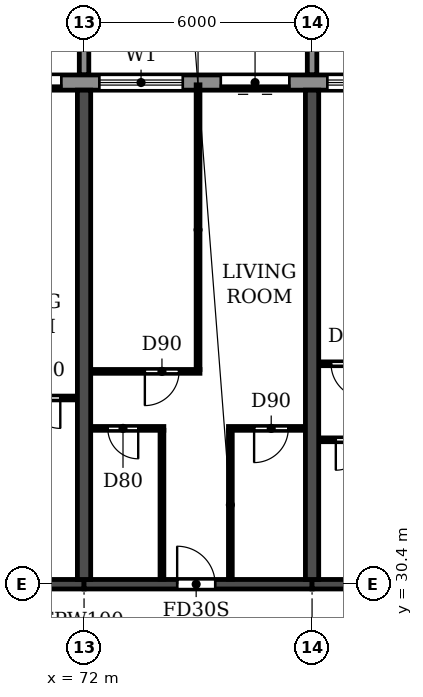
"""IFC4 building model, lengths in metres.
Left out: names, types, materials, properties, quantities, classifications, styles, units other than length and angle.
Written with IfcOpenShell. Run it as: python <this file> out.ifc"""

import sys

from ifc_helpers import new_model, si_unit, direction, frame, frame_2d, origin, place, context, subcontext, project, spatial, polyline, rectangle, outline, extrude, source, transform, mapped, element, fill, save


model = new_model("IFC4")
c1 = context("Model", 3, precision=1e-05, world=origin(), true_north=direction((0.0, 1.0)))
c2 = subcontext(c1, "Body", "Model", "MODEL_VIEW")
j1 = project(units=[si_unit("LENGTHUNIT", "METRE"), si_unit("PLANEANGLEUNIT", "RADIAN")], contexts=[c1])
p1 = place(None, origin())
s1 = spatial("IfcSite", under=j1, at=p1, CompositionType="ELEMENT")
p2 = place(p1, origin())
s2 = spatial("IfcBuilding", under=s1, at=p2, CompositionType="ELEMENT")
p3 = place(p2, frame((0.0, 0.0, 92.7)))
s3 = spatial("IfcBuildingStorey", under=s2, at=p3, CompositionType="ELEMENT", Elevation=92.7)
for number, where, z_axis, x_axis in (
    (1, (72.0, 30.525, 0.0), (0.0, 0.0, 1.0), (0.0, 1.0, 0.0)),
    (2, (78.0, 30.525, 0.0), (0.0, 0.0, 1.0), (0.0, 1.0, 0.0)),
):
    element("IfcWall", number, at=place(p3, frame(where, z_axis=z_axis, x_axis=x_axis)), inside=s3, PredefinedType="SHEAR", context=c2, shape_type="SweptSolid", body=[
        extrude(rectangle(XDim=12.875, YDim=0.35, at=frame_2d((6.438, 0.0))), origin(), (0.0, 0.0, 1.0), 3.06),
    ])
p4 = place(p3, frame((66.0, 30.4, 0.0), z_axis=(0.0, 0.0, 1.0), x_axis=(1.0, 0.0, 0.0)))
e3 = element("IfcWall", 3, at=p4, inside=s3, PredefinedType="SHEAR", context=c2, shape_type="SweptSolid", body=[
    extrude(rectangle(XDim=6.0, YDim=0.25, at=frame_2d((3.0, 0.0))), origin(), (0.0, 0.0, 1.0), 2.46),
])
p5 = place(p4, frame((2.55, 0.0, 0.0)))
e4 = element("IfcOpeningElement", 4, at=p5, cuts=e3, PredefinedType="OPENING", context=c2, shape_type="SweptSolid", body=[
    extrude(rectangle(XDim=1.0, YDim=2.1, at=frame_2d((0.5, 1.05))), frame((0.0, 0.135, 0.0), z_axis=(0.0, -1.0, 0.0), x_axis=(1.0, 0.0, 0.0)), (0.0, 0.0, 1.0), 0.27),
])
p6 = place(p3, frame((72.0, 30.4, 0.0), z_axis=(0.0, 0.0, 1.0), x_axis=(1.0, 0.0, 0.0)))
e5 = element("IfcWall", 5, at=p6, inside=s3, PredefinedType="SHEAR", context=c2, shape_type="SweptSolid", body=[
    extrude(rectangle(XDim=6.0, YDim=0.25, at=frame_2d((3.0, 0.0))), origin(), (0.0, 0.0, 1.0), 2.46),
])
p7 = place(p6, frame((2.45, 0.0, 0.0)))
e6 = element("IfcOpeningElement", 6, at=p7, cuts=e5, PredefinedType="OPENING", context=c2, shape_type="SweptSolid", body=[
    extrude(rectangle(XDim=1.0, YDim=2.1, at=frame_2d((0.5, 1.05))), frame((0.0, 0.135, 0.0), z_axis=(0.0, -1.0, 0.0), x_axis=(1.0, 0.0, 0.0)), (0.0, 0.0, 1.0), 0.27),
])
p8 = place(p3, frame((78.0, 30.4, 0.0), z_axis=(0.0, 0.0, 1.0), x_axis=(1.0, 0.0, 0.0)))
e7 = element("IfcWall", 7, at=p8, inside=s3, PredefinedType="SHEAR", context=c2, shape_type="SweptSolid", body=[
    extrude(rectangle(XDim=6.0, YDim=0.25, at=frame_2d((3.0, 0.0))), origin(), (0.0, 0.0, 1.0), 2.46),
])
p9 = place(p8, frame((2.45, 0.0, 0.0)))
e8 = element("IfcOpeningElement", 8, at=p9, cuts=e7, PredefinedType="OPENING", context=c2, shape_type="SweptSolid", body=[
    extrude(rectangle(XDim=1.0, YDim=2.1, at=frame_2d((0.5, 1.05))), frame((0.0, 0.135, 0.0), z_axis=(0.0, -1.0, 0.0), x_axis=(1.0, 0.0, 0.0)), (0.0, 0.0, 1.0), 0.27),
])
p10 = place(p3, frame((91.317, 43.6, 0.0), z_axis=(0.0, 0.0, 1.0), x_axis=(-1.0, 0.0, 0.0)))
e9 = element("IfcWall", 9, at=p10, inside=s3, PredefinedType="STANDARD", context=c2, shape_type="SweptSolid", body=[
    extrude(rectangle(XDim=80.634, YDim=0.4, at=frame_2d((40.317, 0.0))), origin(), (0.0, 0.0, 1.0), 3.06),
])
p11 = place(p10, frame((76.717, 0.0, 0.9)))
e10 = element("IfcOpeningElement", 10, at=p11, cuts=e9, PredefinedType="OPENING", context=c2, shape_type="SweptSolid", body=[
    extrude(rectangle(XDim=2.2, YDim=1.5, at=frame_2d((1.1, 0.75))), frame((0.0, 0.21, 0.0), z_axis=(0.0, -1.0, 0.0), x_axis=(1.0, 0.0, 0.0)), (0.0, 0.0, 1.0), 0.42),
])
p12 = place(p10, frame((73.917, 0.0, 0.0)))
e11 = element("IfcOpeningElement", 11, at=p12, cuts=e9, PredefinedType="OPENING", context=c2, shape_type="SweptSolid", body=[
    extrude(rectangle(XDim=1.8, YDim=2.4, at=frame_2d((0.9, 1.2))), frame((0.0, 0.21, 0.0), z_axis=(0.0, -1.0, 0.0), x_axis=(1.0, 0.0, 0.0)), (0.0, 0.0, 1.0), 0.42),
])
p13 = place(p10, frame((70.717, 0.0, 0.9)))
e12 = element("IfcOpeningElement", 12, at=p13, cuts=e9, PredefinedType="OPENING", context=c2, shape_type="SweptSolid", body=[
    extrude(rectangle(XDim=2.2, YDim=1.5, at=frame_2d((1.1, 0.75))), frame((0.0, 0.21, 0.0), z_axis=(0.0, -1.0, 0.0), x_axis=(1.0, 0.0, 0.0)), (0.0, 0.0, 1.0), 0.42),
])
p14 = place(p10, frame((67.717, 0.0, 0.9)))
e13 = element("IfcOpeningElement", 13, at=p14, cuts=e9, PredefinedType="OPENING", context=c2, shape_type="SweptSolid", body=[
    extrude(rectangle(XDim=2.2, YDim=1.5, at=frame_2d((1.1, 0.75))), frame((0.0, 0.21, 0.0), z_axis=(0.0, -1.0, 0.0), x_axis=(1.0, 0.0, 0.0)), (0.0, 0.0, 1.0), 0.42),
])
p15 = place(p10, frame((64.717, 0.0, 0.9)))
e14 = element("IfcOpeningElement", 14, at=p15, cuts=e9, PredefinedType="OPENING", context=c2, shape_type="SweptSolid", body=[
    extrude(rectangle(XDim=2.2, YDim=1.5, at=frame_2d((1.1, 0.75))), frame((0.0, 0.21, 0.0), z_axis=(0.0, -1.0, 0.0), x_axis=(1.0, 0.0, 0.0)), (0.0, 0.0, 1.0), 0.42),
])
p16 = place(p10, frame((61.917, 0.0, 0.0)))
e15 = element("IfcOpeningElement", 15, at=p16, cuts=e9, PredefinedType="OPENING", context=c2, shape_type="SweptSolid", body=[
    extrude(rectangle(XDim=1.8, YDim=2.4, at=frame_2d((0.9, 1.2))), frame((0.0, 0.21, 0.0), z_axis=(0.0, -1.0, 0.0), x_axis=(1.0, 0.0, 0.0)), (0.0, 0.0, 1.0), 0.42),
])
p17 = place(p10, frame((58.717, 0.0, 0.9)))
e16 = element("IfcOpeningElement", 16, at=p17, cuts=e9, PredefinedType="OPENING", context=c2, shape_type="SweptSolid", body=[
    extrude(rectangle(XDim=2.2, YDim=1.5, at=frame_2d((1.1, 0.75))), frame((0.0, 0.21, 0.0), z_axis=(0.0, -1.0, 0.0), x_axis=(1.0, 0.0, 0.0)), (0.0, 0.0, 1.0), 0.42),
])
p18 = place(p10, frame((55.717, 0.0, 0.9)))
e17 = element("IfcOpeningElement", 17, at=p18, cuts=e9, PredefinedType="OPENING", context=c2, shape_type="SweptSolid", body=[
    extrude(rectangle(XDim=2.2, YDim=1.5, at=frame_2d((1.1, 0.75))), frame((0.0, 0.21, 0.0), z_axis=(0.0, -1.0, 0.0), x_axis=(1.0, 0.0, 0.0)), (0.0, 0.0, 1.0), 0.42),
])
p19 = place(p10, frame((52.917, 0.0, 0.0)))
e18 = element("IfcOpeningElement", 18, at=p19, cuts=e9, PredefinedType="OPENING", context=c2, shape_type="SweptSolid", body=[
    extrude(rectangle(XDim=1.8, YDim=2.4, at=frame_2d((0.9, 1.2))), frame((0.0, 0.21, 0.0), z_axis=(0.0, -1.0, 0.0), x_axis=(1.0, 0.0, 0.0)), (0.0, 0.0, 1.0), 0.42),
])
p20 = place(p10, frame((49.717, 0.0, 0.9)))
e19 = element("IfcOpeningElement", 19, at=p20, cuts=e9, PredefinedType="OPENING", context=c2, shape_type="SweptSolid", body=[
    extrude(rectangle(XDim=2.2, YDim=1.5, at=frame_2d((1.1, 0.75))), frame((0.0, 0.21, 0.0), z_axis=(0.0, -1.0, 0.0), x_axis=(1.0, 0.0, 0.0)), (0.0, 0.0, 1.0), 0.42),
])
p21 = place(p10, frame((46.717, 0.0, 0.9)))
e20 = element("IfcOpeningElement", 20, at=p21, cuts=e9, PredefinedType="OPENING", context=c2, shape_type="SweptSolid", body=[
    extrude(rectangle(XDim=2.2, YDim=1.5, at=frame_2d((1.1, 0.75))), frame((0.0, 0.21, 0.0), z_axis=(0.0, -1.0, 0.0), x_axis=(1.0, 0.0, 0.0)), (0.0, 0.0, 1.0), 0.42),
])
p22 = place(p10, frame((43.717, 0.0, 0.9)))
e21 = element("IfcOpeningElement", 21, at=p22, cuts=e9, PredefinedType="OPENING", context=c2, shape_type="SweptSolid", body=[
    extrude(rectangle(XDim=2.2, YDim=1.5, at=frame_2d((1.1, 0.75))), frame((0.0, 0.21, 0.0), z_axis=(0.0, -1.0, 0.0), x_axis=(1.0, 0.0, 0.0)), (0.0, 0.0, 1.0), 0.42),
])
p23 = place(p10, frame((40.717, 0.0, 0.9)))
e22 = element("IfcOpeningElement", 22, at=p23, cuts=e9, PredefinedType="OPENING", context=c2, shape_type="SweptSolid", body=[
    extrude(rectangle(XDim=2.2, YDim=1.5, at=frame_2d((1.1, 0.75))), frame((0.0, 0.21, 0.0), z_axis=(0.0, -1.0, 0.0), x_axis=(1.0, 0.0, 0.0)), (0.0, 0.0, 1.0), 0.42),
])
p24 = place(p10, frame((37.917, 0.0, 0.0)))
e23 = element("IfcOpeningElement", 23, at=p24, cuts=e9, PredefinedType="OPENING", context=c2, shape_type="SweptSolid", body=[
    extrude(rectangle(XDim=1.8, YDim=2.4, at=frame_2d((0.9, 1.2))), frame((0.0, 0.21, 0.0), z_axis=(0.0, -1.0, 0.0), x_axis=(1.0, 0.0, 0.0)), (0.0, 0.0, 1.0), 0.42),
])
p25 = place(p10, frame((34.917, 0.0, 0.0)))
e24 = element("IfcOpeningElement", 24, at=p25, cuts=e9, PredefinedType="OPENING", context=c2, shape_type="SweptSolid", body=[
    extrude(rectangle(XDim=1.8, YDim=2.4, at=frame_2d((0.9, 1.2))), frame((0.0, 0.21, 0.0), z_axis=(0.0, -1.0, 0.0), x_axis=(1.0, 0.0, 0.0)), (0.0, 0.0, 1.0), 0.42),
])
p26 = place(p10, frame((31.717, 0.0, 0.9)))
e25 = element("IfcOpeningElement", 25, at=p26, cuts=e9, PredefinedType="OPENING", context=c2, shape_type="SweptSolid", body=[
    extrude(rectangle(XDim=2.2, YDim=1.5, at=frame_2d((1.1, 0.75))), frame((0.0, 0.21, 0.0), z_axis=(0.0, -1.0, 0.0), x_axis=(1.0, 0.0, 0.0)), (0.0, 0.0, 1.0), 0.42),
])
p27 = place(p10, frame((28.717, 0.0, 0.9)))
e26 = element("IfcOpeningElement", 26, at=p27, cuts=e9, PredefinedType="OPENING", context=c2, shape_type="SweptSolid", body=[
    extrude(rectangle(XDim=2.2, YDim=1.5, at=frame_2d((1.1, 0.75))), frame((0.0, 0.21, 0.0), z_axis=(0.0, -1.0, 0.0), x_axis=(1.0, 0.0, 0.0)), (0.0, 0.0, 1.0), 0.42),
])
p28 = place(p10, frame((25.717, 0.0, 0.9)))
e27 = element("IfcOpeningElement", 27, at=p28, cuts=e9, PredefinedType="OPENING", context=c2, shape_type="SweptSolid", body=[
    extrude(rectangle(XDim=2.2, YDim=1.5, at=frame_2d((1.1, 0.75))), frame((0.0, 0.21, 0.0), z_axis=(0.0, -1.0, 0.0), x_axis=(1.0, 0.0, 0.0)), (0.0, 0.0, 1.0), 0.42),
])
p29 = place(p10, frame((22.717, 0.0, 0.9)))
e28 = element("IfcOpeningElement", 28, at=p29, cuts=e9, PredefinedType="OPENING", context=c2, shape_type="SweptSolid", body=[
    extrude(rectangle(XDim=2.2, YDim=1.5, at=frame_2d((1.1, 0.75))), frame((0.0, 0.21, 0.0), z_axis=(0.0, -1.0, 0.0), x_axis=(1.0, 0.0, 0.0)), (0.0, 0.0, 1.0), 0.42),
])
p30 = place(p10, frame((19.917, 0.0, 0.0)))
e29 = element("IfcOpeningElement", 29, at=p30, cuts=e9, PredefinedType="OPENING", context=c2, shape_type="SweptSolid", body=[
    extrude(rectangle(XDim=1.8, YDim=2.4, at=frame_2d((0.9, 1.2))), frame((0.0, 0.21, 0.0), z_axis=(0.0, -1.0, 0.0), x_axis=(1.0, 0.0, 0.0)), (0.0, 0.0, 1.0), 0.42),
])
p31 = place(p10, frame((16.717, 0.0, 0.9)))
e30 = element("IfcOpeningElement", 30, at=p31, cuts=e9, PredefinedType="OPENING", context=c2, shape_type="SweptSolid", body=[
    extrude(rectangle(XDim=2.2, YDim=1.5, at=frame_2d((1.1, 0.75))), frame((0.0, 0.21, 0.0), z_axis=(0.0, -1.0, 0.0), x_axis=(1.0, 0.0, 0.0)), (0.0, 0.0, 1.0), 0.42),
])
p32 = place(p10, frame((13.917, 0.0, 0.0)))
e31 = element("IfcOpeningElement", 31, at=p32, cuts=e9, PredefinedType="OPENING", context=c2, shape_type="SweptSolid", body=[
    extrude(rectangle(XDim=1.8, YDim=2.4, at=frame_2d((0.9, 1.2))), frame((0.0, 0.21, 0.0), z_axis=(0.0, -1.0, 0.0), x_axis=(1.0, 0.0, 0.0)), (0.0, 0.0, 1.0), 0.42),
])
p33 = place(p10, frame((10.717, 0.0, 0.9)))
e32 = element("IfcOpeningElement", 32, at=p33, cuts=e9, PredefinedType="OPENING", context=c2, shape_type="SweptSolid", body=[
    extrude(rectangle(XDim=2.2, YDim=1.5, at=frame_2d((1.1, 0.75))), frame((0.0, 0.21, 0.0), z_axis=(0.0, -1.0, 0.0), x_axis=(1.0, 0.0, 0.0)), (0.0, 0.0, 1.0), 0.42),
])
p34 = place(p10, frame((7.917, 0.0, 0.0)))
e33 = element("IfcOpeningElement", 33, at=p34, cuts=e9, PredefinedType="OPENING", context=c2, shape_type="SweptSolid", body=[
    extrude(rectangle(XDim=1.8, YDim=2.4, at=frame_2d((0.9, 1.2))), frame((0.0, 0.21, 0.0), z_axis=(0.0, -1.0, 0.0), x_axis=(1.0, 0.0, 0.0)), (0.0, 0.0, 1.0), 0.42),
])
p35 = place(p10, frame((4.717, 0.0, 0.9)))
e34 = element("IfcOpeningElement", 34, at=p35, cuts=e9, PredefinedType="OPENING", context=c2, shape_type="SweptSolid", body=[
    extrude(rectangle(XDim=2.2, YDim=1.5, at=frame_2d((1.1, 0.75))), frame((0.0, 0.21, 0.0), z_axis=(0.0, -1.0, 0.0), x_axis=(1.0, 0.0, 0.0)), (0.0, 0.0, 1.0), 0.42),
])
p36 = place(p10, frame((1.917, 0.0, 0.0)))
e35 = element("IfcOpeningElement", 35, at=p36, cuts=e9, PredefinedType="OPENING", context=c2, shape_type="SweptSolid", body=[
    extrude(rectangle(XDim=1.8, YDim=2.4, at=frame_2d((0.9, 1.2))), frame((0.0, 0.21, 0.0), z_axis=(0.0, -1.0, 0.0), x_axis=(1.0, 0.0, 0.0)), (0.0, 0.0, 1.0), 0.42),
])
m1 = source(origin(), c2, "Body", "SweptSolid", [
    extrude(outline(polyline([(0.0, 0.0), (0.25, 0.0), (0.25, 3.1), (0.0, 3.1), (0.0, 0.0)])), origin(), (0.0, 0.0, 1.0), 3.1),
])
for number, where in (
    (36, (71.875, 43.8, 0.0)),
    (37, (77.875, 43.8, 0.0)),
):
    element("IfcWall", number, at=place(p3, frame(where)), inside=s3, PredefinedType="STANDARD", context=c2, shape_type="MappedRepresentation", body=[
        mapped(m1, transform((0.0, 0.0, 0.0))),
    ])
p37 = place(p3, frame((78.185, 34.2, 0.0), z_axis=(0.0, 0.0, 1.0), x_axis=(1.0, 0.0, 0.0)))
e38 = element("IfcWall", 38, at=p37, inside=s3, PredefinedType="PARTITIONING", context=c2, shape_type="SweptSolid", body=[
    extrude(rectangle(XDim=1.915, YDim=0.1, at=frame_2d((0.958, 0.0))), origin(), (0.0, 0.0, 1.0), 3.06),
])
p38 = place(p37, frame((0.44, 0.0, 0.0)))
e39 = element("IfcOpeningElement", 39, at=p38, cuts=e38, PredefinedType="OPENING", context=c2, shape_type="SweptSolid", body=[
    extrude(rectangle(XDim=0.8, YDim=2.1, at=frame_2d((0.4, 1.05))), frame((0.0, 0.06, 0.0), z_axis=(0.0, -1.0, 0.0), x_axis=(1.0, 0.0, 0.0)), (0.0, 0.0, 1.0), 0.12),
])
p39 = place(p3, frame((72.185, 34.5, 0.0), z_axis=(0.0, 0.0, 1.0), x_axis=(1.0, 0.0, 0.0)))
e40 = element("IfcWall", 40, at=p39, inside=s3, PredefinedType="PARTITIONING", context=c2, shape_type="SweptSolid", body=[
    extrude(rectangle(XDim=1.915, YDim=0.1, at=frame_2d((0.958, 0.0))), origin(), (0.0, 0.0, 1.0), 3.06),
])
p40 = place(p39, frame((0.44, 0.0, 0.0)))
e41 = element("IfcOpeningElement", 41, at=p40, cuts=e40, PredefinedType="OPENING", context=c2, shape_type="SweptSolid", body=[
    extrude(rectangle(XDim=0.8, YDim=2.1, at=frame_2d((0.4, 1.05))), frame((0.0, 0.06, 0.0), z_axis=(0.0, -1.0, 0.0), x_axis=(1.0, 0.0, 0.0)), (0.0, 0.0, 1.0), 0.12),
])
p41 = place(p3, frame((75.8, 34.5, 0.0), z_axis=(0.0, 0.0, 1.0), x_axis=(1.0, 0.0, 0.0)))
e42 = element("IfcWall", 42, at=p41, inside=s3, PredefinedType="PARTITIONING", context=c2, shape_type="SweptSolid", body=[
    extrude(rectangle(XDim=2.015, YDim=0.1, at=frame_2d((1.007, 0.0))), origin(), (0.0, 0.0, 1.0), 3.06),
])
p42 = place(p41, frame((0.675, 0.0, 0.0)))
e43 = element("IfcOpeningElement", 43, at=p42, cuts=e42, PredefinedType="OPENING", context=c2, shape_type="SweptSolid", body=[
    extrude(rectangle(XDim=0.9, YDim=2.1, at=frame_2d((0.45, 1.05))), frame((0.0, 0.06, 0.0), z_axis=(0.0, -1.0, 0.0), x_axis=(1.0, 0.0, 0.0)), (0.0, 0.0, 1.0), 0.12),
])
p43 = place(p3, frame((69.9, 35.3, 0.0), z_axis=(0.0, 0.0, 1.0), x_axis=(1.0, 0.0, 0.0)))
e44 = element("IfcWall", 44, at=p43, inside=s3, PredefinedType="PARTITIONING", context=c2, shape_type="SweptSolid", body=[
    extrude(rectangle(XDim=1.915, YDim=0.1, at=frame_2d((0.958, 0.0))), origin(), (0.0, 0.0, 1.0), 3.06),
])
p44 = place(p43, frame((0.675, 0.0, 0.0)))
e45 = element("IfcOpeningElement", 45, at=p44, cuts=e44, PredefinedType="OPENING", context=c2, shape_type="SweptSolid", body=[
    extrude(rectangle(XDim=0.8, YDim=2.1, at=frame_2d((0.4, 1.05))), frame((0.0, 0.06, 0.0), z_axis=(0.0, -1.0, 0.0), x_axis=(1.0, 0.0, 0.0)), (0.0, 0.0, 1.0), 0.12),
])
p45 = place(p3, frame((72.185, 36.0, 0.0), z_axis=(0.0, 0.0, 1.0), x_axis=(1.0, 0.0, 0.0)))
e46 = element("IfcWall", 46, at=p45, inside=s3, PredefinedType="PARTITIONING", context=c2, shape_type="SweptSolid", body=[
    extrude(rectangle(XDim=2.865, YDim=0.1, at=frame_2d((1.433, 0.0))), origin(), (0.0, 0.0, 1.0), 3.06),
])
p46 = place(p45, frame((1.415, 0.0, 0.0)))
e47 = element("IfcOpeningElement", 47, at=p46, cuts=e46, PredefinedType="OPENING", context=c2, shape_type="SweptSolid", body=[
    extrude(rectangle(XDim=0.9, YDim=2.1, at=frame_2d((0.45, 1.05))), frame((0.0, 0.06, 0.0), z_axis=(0.0, -1.0, 0.0), x_axis=(1.0, 0.0, 0.0)), (0.0, 0.0, 1.0), 0.12),
])
p47 = place(p3, frame((78.185, 36.2, 0.0), z_axis=(0.0, 0.0, 1.0), x_axis=(1.0, 0.0, 0.0)))
e48 = element("IfcWall", 48, at=p47, inside=s3, PredefinedType="PARTITIONING", context=c2, shape_type="SweptSolid", body=[
    extrude(rectangle(XDim=2.865, YDim=0.1, at=frame_2d((1.433, 0.0))), origin(), (0.0, 0.0, 1.0), 3.06),
])
p48 = place(p47, frame((0.315, 0.0, 0.0)))
e49 = element("IfcOpeningElement", 49, at=p48, cuts=e48, PredefinedType="OPENING", context=c2, shape_type="SweptSolid", body=[
    extrude(rectangle(XDim=0.9, YDim=2.1, at=frame_2d((0.45, 1.05))), frame((0.0, 0.06, 0.0), z_axis=(0.0, -1.0, 0.0), x_axis=(1.0, 0.0, 0.0)), (0.0, 0.0, 1.0), 0.12),
])
p49 = place(p3, frame((74.05, 30.535, 0.0), z_axis=(0.0, 0.0, 1.0), x_axis=(0.0, 1.0, 0.0)))
e50 = element("IfcWall", 50, at=p49, inside=s3, PredefinedType="PARTITIONING", context=c2, shape_type="SweptSolid", body=[
    extrude(rectangle(XDim=3.915, YDim=0.1, at=frame_2d((1.958, 0.0))), origin(), (0.0, 0.0, 1.0), 3.06),
])
p50 = place(p3, frame((75.0, 36.05, 0.0), z_axis=(0.0, 0.0, 1.0), x_axis=(0.0, 1.0, 0.0)))
e51 = element("IfcWall", 51, at=p50, inside=s3, PredefinedType="PARTITIONING", context=c2, shape_type="SweptSolid", body=[
    extrude(rectangle(XDim=7.49, YDim=0.1, at=frame_2d((3.745, 0.0))), origin(), (0.0, 0.0, 1.0), 3.06),
])
p51 = place(p3, frame((75.85, 30.535, 0.0), z_axis=(0.0, 0.0, 1.0), x_axis=(0.0, 1.0, 0.0)))
e52 = element("IfcWall", 52, at=p51, inside=s3, PredefinedType="PARTITIONING", context=c2, shape_type="SweptSolid", body=[
    extrude(rectangle(XDim=3.915, YDim=0.1, at=frame_2d((1.958, 0.0))), origin(), (0.0, 0.0, 1.0), 3.06),
])
p52 = place(p30, origin())
e53 = element("IfcDoor", 53, at=p52, inside=s3, OperationType="DOUBLE_DOOR_SLIDING", PredefinedType="DOOR", context=c2, shape_type="SweptSolid", body=[
    extrude(rectangle(XDim=1.8, YDim=2.4, at=frame_2d((0.9, 1.2))), frame((0.0, 0.025, 0.0), z_axis=(0.0, -1.0, 0.0), x_axis=(1.0, 0.0, 0.0)), (0.0, 0.0, 1.0), 0.05),
])
fill(e29, e53)
p53 = place(p31, origin())
e54 = element("IfcWindow", 54, at=p53, inside=s3, PartitioningType="DOUBLE_PANEL_HORIZONTAL", PredefinedType="WINDOW", context=c2, shape_type="SweptSolid", body=[
    extrude(rectangle(XDim=2.2, YDim=1.5, at=frame_2d((1.1, 0.75))), frame((0.0, 0.03, 0.0), z_axis=(0.0, -1.0, 0.0), x_axis=(1.0, 0.0, 0.0)), (0.0, 0.0, 1.0), 0.06),
])
fill(e30, e54)
p54 = place(p32, origin())
e55 = element("IfcDoor", 55, at=p54, inside=s3, OperationType="DOUBLE_DOOR_SLIDING", PredefinedType="DOOR", context=c2, shape_type="SweptSolid", body=[
    extrude(rectangle(XDim=1.8, YDim=2.4, at=frame_2d((0.9, 1.2))), frame((0.0, 0.025, 0.0), z_axis=(0.0, -1.0, 0.0), x_axis=(1.0, 0.0, 0.0)), (0.0, 0.0, 1.0), 0.05),
])
fill(e31, e55)
p55 = place(p33, origin())
e56 = element("IfcWindow", 56, at=p55, inside=s3, PartitioningType="DOUBLE_PANEL_HORIZONTAL", PredefinedType="WINDOW", context=c2, shape_type="SweptSolid", body=[
    extrude(rectangle(XDim=2.2, YDim=1.5, at=frame_2d((1.1, 0.75))), frame((0.0, 0.03, 0.0), z_axis=(0.0, -1.0, 0.0), x_axis=(1.0, 0.0, 0.0)), (0.0, 0.0, 1.0), 0.06),
])
fill(e32, e56)
p56 = place(p44, frame((0.8, 0.0, 0.0), z_axis=(0.0, 0.0, 1.0), x_axis=(-1.0, 0.0, 0.0)))
e57 = element("IfcDoor", 57, at=p56, inside=s3, OperationType="SINGLE_SWING_LEFT", PredefinedType="DOOR", context=c2, shape_type="SweptSolid", body=[
    extrude(rectangle(XDim=0.8, YDim=2.1, at=frame_2d((0.4, 1.05))), frame((0.0, 0.025, 0.0), z_axis=(0.0, -1.0, 0.0), x_axis=(1.0, 0.0, 0.0)), (0.0, 0.0, 1.0), 0.05),
])
fill(e45, e57)
p57 = place(p40, frame((0.8, 0.0, 0.0), z_axis=(0.0, 0.0, 1.0), x_axis=(-1.0, 0.0, 0.0)))
e58 = element("IfcDoor", 58, at=p57, inside=s3, OperationType="SINGLE_SWING_LEFT", PredefinedType="DOOR", context=c2, shape_type="SweptSolid", body=[
    extrude(rectangle(XDim=0.8, YDim=2.1, at=frame_2d((0.4, 1.05))), frame((0.0, 0.025, 0.0), z_axis=(0.0, -1.0, 0.0), x_axis=(1.0, 0.0, 0.0)), (0.0, 0.0, 1.0), 0.05),
])
fill(e41, e58)
p58 = place(p46, frame((0.9, 0.0, 0.0), z_axis=(0.0, 0.0, 1.0), x_axis=(-1.0, 0.0, 0.0)))
e59 = element("IfcDoor", 59, at=p58, inside=s3, OperationType="SINGLE_SWING_RIGHT", PredefinedType="DOOR", context=c2, shape_type="SweptSolid", body=[
    extrude(rectangle(XDim=0.9, YDim=2.1, at=frame_2d((0.45, 1.05))), frame((0.0, 0.025, 0.0), z_axis=(0.0, -1.0, 0.0), x_axis=(1.0, 0.0, 0.0)), (0.0, 0.0, 1.0), 0.05),
])
fill(e47, e59)
p59 = place(p7, origin())
e60 = element("IfcDoor", 60, at=p59, inside=s3, OperationType="SINGLE_SWING_LEFT", PredefinedType="DOOR", context=c2, shape_type="SweptSolid", body=[
    extrude(rectangle(XDim=1.0, YDim=2.1, at=frame_2d((0.5, 1.05))), frame((0.0, 0.025, 0.0), z_axis=(0.0, -1.0, 0.0), x_axis=(1.0, 0.0, 0.0)), (0.0, 0.0, 1.0), 0.05),
])
fill(e6, e60)
p60 = place(p42, frame((0.9, 0.0, 0.0), z_axis=(0.0, 0.0, 1.0), x_axis=(-1.0, 0.0, 0.0)))
e61 = element("IfcDoor", 61, at=p60, inside=s3, OperationType="SINGLE_SWING_RIGHT", PredefinedType="DOOR", context=c2, shape_type="SweptSolid", body=[
    extrude(rectangle(XDim=0.9, YDim=2.1, at=frame_2d((0.45, 1.05))), frame((0.0, 0.025, 0.0), z_axis=(0.0, -1.0, 0.0), x_axis=(1.0, 0.0, 0.0)), (0.0, 0.0, 1.0), 0.05),
])
fill(e43, e61)
p61 = place(p48, frame((0.9, 0.0, 0.0), z_axis=(0.0, 0.0, 1.0), x_axis=(-1.0, 0.0, 0.0)))
e62 = element("IfcDoor", 62, at=p61, inside=s3, OperationType="SINGLE_SWING_LEFT", PredefinedType="DOOR", context=c2, shape_type="SweptSolid", body=[
    extrude(rectangle(XDim=0.9, YDim=2.1, at=frame_2d((0.45, 1.05))), frame((0.0, 0.025, 0.0), z_axis=(0.0, -1.0, 0.0), x_axis=(1.0, 0.0, 0.0)), (0.0, 0.0, 1.0), 0.05),
])
fill(e49, e62)
p62 = place(p38, frame((0.8, 0.0, 0.0), z_axis=(0.0, 0.0, 1.0), x_axis=(-1.0, 0.0, 0.0)))
e63 = element("IfcDoor", 63, at=p62, inside=s3, OperationType="SINGLE_SWING_RIGHT", PredefinedType="DOOR", context=c2, shape_type="SweptSolid", body=[
    extrude(rectangle(XDim=0.8, YDim=2.1, at=frame_2d((0.4, 1.05))), frame((0.0, 0.025, 0.0), z_axis=(0.0, -1.0, 0.0), x_axis=(1.0, 0.0, 0.0)), (0.0, 0.0, 1.0), 0.05),
])
fill(e39, e63)
save(model, sys.argv[1])
